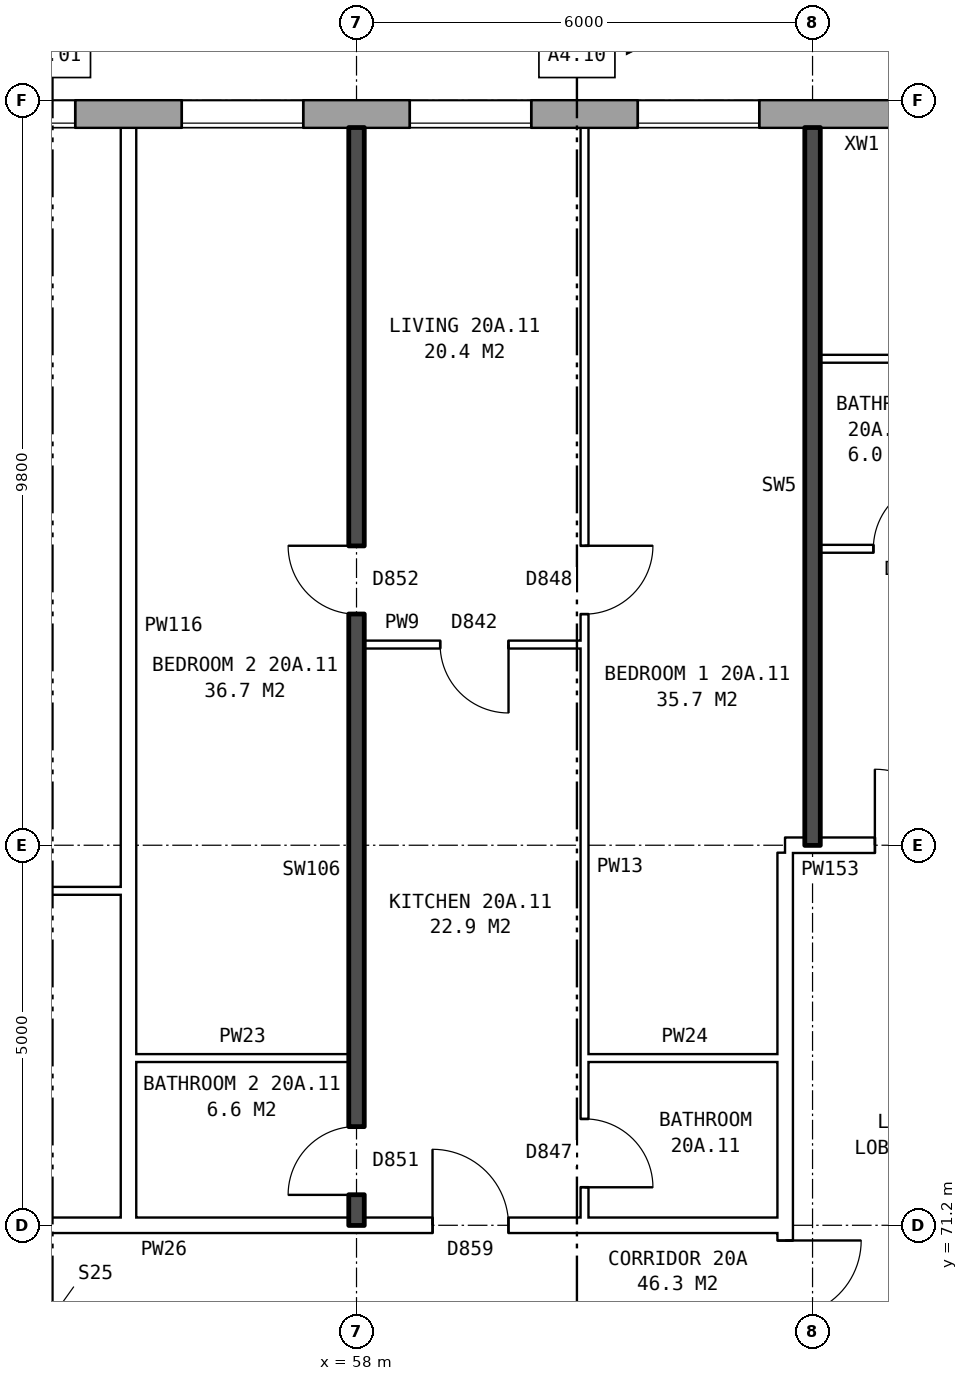
"""IFC4 building model, lengths in metres.
Left out: names, types, materials, properties, quantities, classifications, styles, units other than length and angle.
Written with IfcOpenShell. Run it as: python <this file> out.ifc"""

import sys

from ifc_helpers import new_model, si_unit, direction, frame, frame_2d, origin, place, context, subcontext, project, spatial, rectangle, extrude, element, fill, save


model = new_model("IFC4")
c1 = context("Model", 3, precision=1e-05, world=origin(), true_north=direction((0.0, 1.0)))
c2 = subcontext(c1, "Body", "Model", "MODEL_VIEW")
j1 = project(units=[si_unit("LENGTHUNIT", "METRE"), si_unit("PLANEANGLEUNIT", "RADIAN")], contexts=[c1])
p1 = place(None, origin())
s1 = spatial("IfcSite", under=j1, at=p1, CompositionType="ELEMENT")
p2 = place(p1, origin())
s2 = spatial("IfcBuilding", under=s1, at=p2, CompositionType="ELEMENT")
p3 = place(p2, frame((0.0, 0.0, 74.7)))
s3 = spatial("IfcBuildingStorey", under=s2, at=p3, CompositionType="ELEMENT", Elevation=74.7)
p4 = place(p3, frame((72.925, 85.82, 0.0), z_axis=(0.0, 0.0, 1.0), x_axis=(-1.0, 0.0, 0.0)))
e1 = element("IfcWall", 1, at=p4, inside=s3, PredefinedType="STANDARD", context=c2, shape_type="SweptSolid", body=[
    extrude(rectangle(XDim=46.601, YDim=0.36, at=frame_2d((23.3, 0.0))), origin(), (0.0, 0.0, 1.0), 2.85),
])
p5 = place(p4, frame((0.625, 0.0, 0.8)))
e2 = element("IfcOpeningElement", 2, at=p5, cuts=e1, PredefinedType="OPENING", context=c2, shape_type="SweptSolid", body=[
    extrude(rectangle(XDim=1.6, YDim=1.8, at=frame_2d((0.8, 0.9))), frame((0.0, 0.19, 0.0), z_axis=(0.0, -1.0, 0.0), x_axis=(1.0, 0.0, 0.0)), (0.0, 0.0, 1.0), 0.38),
])
p6 = place(p4, frame((3.625, 0.0, 0.8)))
e3 = element("IfcOpeningElement", 3, at=p6, cuts=e1, PredefinedType="OPENING", context=c2, shape_type="SweptSolid", body=[
    extrude(rectangle(XDim=1.6, YDim=1.8, at=frame_2d((0.8, 0.9))), frame((0.0, 0.19, 0.0), z_axis=(0.0, -1.0, 0.0), x_axis=(1.0, 0.0, 0.0)), (0.0, 0.0, 1.0), 0.38),
])
p7 = place(p4, frame((5.525, 0.0, 1.7)))
e4 = element("IfcOpeningElement", 4, at=p7, cuts=e1, PredefinedType="OPENING", context=c2, shape_type="SweptSolid", body=[
    extrude(rectangle(XDim=1.4, YDim=0.9, at=frame_2d((0.7, 0.45))), frame((0.0, 0.19, 0.0), z_axis=(0.0, -1.0, 0.0), x_axis=(1.0, 0.0, 0.0)), (0.0, 0.0, 1.0), 0.38),
])
p8 = place(p4, frame((9.625, 0.0, 0.8)))
e5 = element("IfcOpeningElement", 5, at=p8, cuts=e1, PredefinedType="OPENING", context=c2, shape_type="SweptSolid", body=[
    extrude(rectangle(XDim=1.6, YDim=1.8, at=frame_2d((0.8, 0.9))), frame((0.0, 0.19, 0.0), z_axis=(0.0, -1.0, 0.0), x_axis=(1.0, 0.0, 0.0)), (0.0, 0.0, 1.0), 0.38),
])
p9 = place(p4, frame((12.625, 0.0, 0.8)))
e6 = element("IfcOpeningElement", 6, at=p9, cuts=e1, PredefinedType="OPENING", context=c2, shape_type="SweptSolid", body=[
    extrude(rectangle(XDim=1.6, YDim=1.8, at=frame_2d((0.8, 0.9))), frame((0.0, 0.19, 0.0), z_axis=(0.0, -1.0, 0.0), x_axis=(1.0, 0.0, 0.0)), (0.0, 0.0, 1.0), 0.38),
])
p10 = place(p4, frame((15.625, 0.0, 0.8)))
e7 = element("IfcOpeningElement", 7, at=p10, cuts=e1, PredefinedType="OPENING", context=c2, shape_type="SweptSolid", body=[
    extrude(rectangle(XDim=1.6, YDim=1.8, at=frame_2d((0.8, 0.9))), frame((0.0, 0.19, 0.0), z_axis=(0.0, -1.0, 0.0), x_axis=(1.0, 0.0, 0.0)), (0.0, 0.0, 1.0), 0.38),
])
p11 = place(p4, frame((18.625, 0.0, 0.8)))
e8 = element("IfcOpeningElement", 8, at=p11, cuts=e1, PredefinedType="OPENING", context=c2, shape_type="SweptSolid", body=[
    extrude(rectangle(XDim=1.6, YDim=1.8, at=frame_2d((0.8, 0.9))), frame((0.0, 0.19, 0.0), z_axis=(0.0, -1.0, 0.0), x_axis=(1.0, 0.0, 0.0)), (0.0, 0.0, 1.0), 0.38),
])
p12 = place(p4, frame((21.625, 0.0, 0.8)))
e9 = element("IfcOpeningElement", 9, at=p12, cuts=e1, PredefinedType="OPENING", context=c2, shape_type="SweptSolid", body=[
    extrude(rectangle(XDim=1.6, YDim=1.8, at=frame_2d((0.8, 0.9))), frame((0.0, 0.19, 0.0), z_axis=(0.0, -1.0, 0.0), x_axis=(1.0, 0.0, 0.0)), (0.0, 0.0, 1.0), 0.38),
])
p13 = place(p4, frame((24.625, 0.0, 0.8)))
e10 = element("IfcOpeningElement", 10, at=p13, cuts=e1, PredefinedType="OPENING", context=c2, shape_type="SweptSolid", body=[
    extrude(rectangle(XDim=1.6, YDim=1.8, at=frame_2d((0.8, 0.9))), frame((0.0, 0.19, 0.0), z_axis=(0.0, -1.0, 0.0), x_axis=(1.0, 0.0, 0.0)), (0.0, 0.0, 1.0), 0.38),
])
p14 = place(p4, frame((27.625, 0.0, 0.8)))
e11 = element("IfcOpeningElement", 11, at=p14, cuts=e1, PredefinedType="OPENING", context=c2, shape_type="SweptSolid", body=[
    extrude(rectangle(XDim=1.6, YDim=1.8, at=frame_2d((0.8, 0.9))), frame((0.0, 0.19, 0.0), z_axis=(0.0, -1.0, 0.0), x_axis=(1.0, 0.0, 0.0)), (0.0, 0.0, 1.0), 0.38),
])
p15 = place(p4, frame((30.625, 0.0, 0.8)))
e12 = element("IfcOpeningElement", 12, at=p15, cuts=e1, PredefinedType="OPENING", context=c2, shape_type="SweptSolid", body=[
    extrude(rectangle(XDim=1.6, YDim=1.8, at=frame_2d((0.8, 0.9))), frame((0.0, 0.19, 0.0), z_axis=(0.0, -1.0, 0.0), x_axis=(1.0, 0.0, 0.0)), (0.0, 0.0, 1.0), 0.38),
])
p16 = place(p4, frame((33.625, 0.0, 0.8)))
e13 = element("IfcOpeningElement", 13, at=p16, cuts=e1, PredefinedType="OPENING", context=c2, shape_type="SweptSolid", body=[
    extrude(rectangle(XDim=1.6, YDim=1.8, at=frame_2d((0.8, 0.9))), frame((0.0, 0.19, 0.0), z_axis=(0.0, -1.0, 0.0), x_axis=(1.0, 0.0, 0.0)), (0.0, 0.0, 1.0), 0.38),
])
p17 = place(p4, frame((36.125, 0.0, 0.8)))
e14 = element("IfcOpeningElement", 14, at=p17, cuts=e1, PredefinedType="OPENING", context=c2, shape_type="SweptSolid", body=[
    extrude(rectangle(XDim=1.0, YDim=1.8, at=frame_2d((0.5, 0.9))), frame((0.0, 0.19, 0.0), z_axis=(0.0, -1.0, 0.0), x_axis=(1.0, 0.0, 0.0)), (0.0, 0.0, 1.0), 0.38),
])
p18 = place(p4, frame((39.625, 0.0, 1.7)))
e15 = element("IfcOpeningElement", 15, at=p18, cuts=e1, PredefinedType="OPENING", context=c2, shape_type="SweptSolid", body=[
    extrude(rectangle(XDim=0.8, YDim=0.9, at=frame_2d((0.4, 0.45))), frame((0.0, 0.19, 0.0), z_axis=(0.0, -1.0, 0.0), x_axis=(1.0, 0.0, 0.0)), (0.0, 0.0, 1.0), 0.38),
])
p19 = place(p4, frame((42.625, 0.0, 0.8)))
e16 = element("IfcOpeningElement", 16, at=p19, cuts=e1, PredefinedType="OPENING", context=c2, shape_type="SweptSolid", body=[
    extrude(rectangle(XDim=1.6, YDim=1.8, at=frame_2d((0.8, 0.9))), frame((0.0, 0.19, 0.0), z_axis=(0.0, -1.0, 0.0), x_axis=(1.0, 0.0, 0.0)), (0.0, 0.0, 1.0), 0.38),
])
p20 = place(p4, frame((37.425, 0.0, 0.8)))
e17 = element("IfcOpeningElement", 17, at=p20, cuts=e1, PredefinedType="OPENING", context=c2, shape_type="SweptSolid", body=[
    extrude(rectangle(XDim=0.8, YDim=0.9, at=frame_2d((0.4, 0.45))), frame((0.0, 0.19, 0.0), z_axis=(0.0, -1.0, 0.0), x_axis=(1.0, 0.0, 0.0)), (0.0, 0.0, 1.0), 0.38),
])
p21 = place(p4, frame((40.725, 0.0, 0.8)))
e18 = element("IfcOpeningElement", 18, at=p21, cuts=e1, PredefinedType="OPENING", context=c2, shape_type="SweptSolid", body=[
    extrude(rectangle(XDim=1.6, YDim=1.8, at=frame_2d((0.8, 0.9))), frame((0.0, 0.19, 0.0), z_axis=(0.0, -1.0, 0.0), x_axis=(1.0, 0.0, 0.0)), (0.0, 0.0, 1.0), 0.38),
])
p22 = place(p3, frame((63.64, 63.9, 0.0), z_axis=(0.0, 0.0, 1.0), x_axis=(0.0, 1.0, 0.0)))
e19 = element("IfcWall", 19, at=p22, inside=s3, PredefinedType="PARTITIONING", context=c2, shape_type="SweptSolid", body=[
    extrude(rectangle(XDim=12.2, YDim=0.2, at=frame_2d((6.1, 0.0))), origin(), (0.0, 0.0, 1.0), 2.85),
])
p23 = place(p22, frame((5.1, 0.0, 0.0)))
e20 = element("IfcOpeningElement", 20, at=p23, cuts=e19, PredefinedType="OPENING", context=c2, shape_type="SweptSolid", body=[
    extrude(rectangle(XDim=2.0, YDim=2.1, at=frame_2d((1.0, 1.05))), frame((0.0, 0.11, 0.0), z_axis=(0.0, -1.0, 0.0), x_axis=(1.0, 0.0, 0.0)), (0.0, 0.0, 1.0), 0.22),
])
p24 = place(p3, frame((44.36, 71.2, 0.0), z_axis=(0.0, 0.0, 1.0), x_axis=(1.0, 0.0, 0.0)))
e21 = element("IfcWall", 21, at=p24, inside=s3, PredefinedType="PARTITIONING", context=c2, shape_type="SweptSolid", body=[
    extrude(rectangle(XDim=19.28, YDim=0.2, at=frame_2d((9.64, 0.0))), origin(), (0.0, 0.0, 1.0), 2.85),
])
p25 = place(p24, frame((14.64, 0.0, 0.0)))
e22 = element("IfcOpeningElement", 22, at=p25, cuts=e21, PredefinedType="OPENING", context=c2, shape_type="SweptSolid", body=[
    extrude(rectangle(XDim=1.0, YDim=2.1, at=frame_2d((0.5, 1.05))), frame((0.0, 0.11, 0.0), z_axis=(0.0, -1.0, 0.0), x_axis=(1.0, 0.0, 0.0)), (0.0, 0.0, 1.0), 0.22),
])
p26 = place(p24, frame((5.64, 0.0, 0.0)))
e23 = element("IfcOpeningElement", 23, at=p26, cuts=e21, PredefinedType="OPENING", context=c2, shape_type="SweptSolid", body=[
    extrude(rectangle(XDim=1.0, YDim=2.1, at=frame_2d((0.5, 1.05))), frame((0.0, 0.11, 0.0), z_axis=(0.0, -1.0, 0.0), x_axis=(1.0, 0.0, 0.0)), (0.0, 0.0, 1.0), 0.22),
])
p27 = place(p3, frame((55.1, 73.4, 0.0), z_axis=(0.0, 0.0, 1.0), x_axis=(1.0, 0.0, 0.0)))
e24 = element("IfcWall", 24, at=p27, inside=s3, PredefinedType="PARTITIONING", context=c2, shape_type="SweptSolid", body=[
    extrude(rectangle(XDim=2.8, YDim=0.1, at=frame_2d((1.4, 0.0))), origin(), (0.0, 0.0, 1.0), 2.85),
])
p28 = place(p3, frame((61.0, 73.4, 0.0), z_axis=(0.0, 0.0, 1.0), x_axis=(1.0, 0.0, 0.0)))
e25 = element("IfcWall", 25, at=p28, inside=s3, PredefinedType="PARTITIONING", context=c2, shape_type="SweptSolid", body=[
    extrude(rectangle(XDim=2.64, YDim=0.1, at=frame_2d((1.32, 0.0))), origin(), (0.0, 0.0, 1.0), 2.85),
])
p29 = place(p3, frame((52.1, 75.6, 0.0), z_axis=(0.0, 0.0, 1.0), x_axis=(1.0, 0.0, 0.0)))
e26 = element("IfcWall", 26, at=p29, inside=s3, PredefinedType="PARTITIONING", context=c2, shape_type="SweptSolid", body=[
    extrude(rectangle(XDim=2.8, YDim=0.1, at=frame_2d((1.4, 0.0))), origin(), (0.0, 0.0, 1.0), 2.85),
])
p30 = place(p3, frame((63.64, 76.2, 0.0), z_axis=(0.0, 0.0, 1.0), x_axis=(1.0, 0.0, 0.0)))
e27 = element("IfcWall", 27, at=p30, inside=s3, PredefinedType="PARTITIONING", context=c2, shape_type="SweptSolid", body=[
    extrude(rectangle(XDim=3.0, YDim=0.2, at=frame_2d((1.5, 0.0))), origin(), (0.0, 0.0, 1.0), 2.85),
])
p31 = place(p30, frame((1.18, 0.0, 0.0)))
e28 = element("IfcOpeningElement", 28, at=p31, cuts=e27, PredefinedType="OPENING", context=c2, shape_type="SweptSolid", body=[
    extrude(rectangle(XDim=1.0, YDim=2.1, at=frame_2d((0.5, 1.05))), frame((0.0, 0.11, 0.0), z_axis=(0.0, -1.0, 0.0), x_axis=(1.0, 0.0, 0.0)), (0.0, 0.0, 1.0), 0.22),
])
p32 = place(p3, frame((58.1, 78.84, 0.0), z_axis=(0.0, 0.0, 1.0), x_axis=(1.0, 0.0, 0.0)))
e29 = element("IfcWall", 29, at=p32, inside=s3, PredefinedType="PARTITIONING", context=c2, shape_type="SweptSolid", body=[
    extrude(rectangle(XDim=2.9, YDim=0.1, at=frame_2d((1.45, 0.0))), origin(), (0.0, 0.0, 1.0), 2.85),
])
p33 = place(p32, frame((1.0, 0.0, 0.0)))
e30 = element("IfcOpeningElement", 30, at=p33, cuts=e29, PredefinedType="OPENING", context=c2, shape_type="SweptSolid", body=[
    extrude(rectangle(XDim=0.9, YDim=2.1, at=frame_2d((0.45, 1.05))), frame((0.0, 0.06, 0.0), z_axis=(0.0, -1.0, 0.0), x_axis=(1.0, 0.0, 0.0)), (0.0, 0.0, 1.0), 0.12),
])
p34 = place(p3, frame((64.1, 80.1, 0.0), z_axis=(0.0, 0.0, 1.0), x_axis=(1.0, 0.0, 0.0)))
e31 = element("IfcWall", 31, at=p34, inside=s3, PredefinedType="PARTITIONING", context=c2, shape_type="SweptSolid", body=[
    extrude(rectangle(XDim=5.8, YDim=0.1, at=frame_2d((2.9, 0.0))), origin(), (0.0, 0.0, 1.0), 2.85),
])
p35 = place(p34, frame((3.6, 0.0, 0.0)))
e32 = element("IfcOpeningElement", 32, at=p35, cuts=e31, PredefinedType="OPENING", context=c2, shape_type="SweptSolid", body=[
    extrude(rectangle(XDim=0.9, YDim=2.1, at=frame_2d((0.45, 1.05))), frame((0.0, 0.06, 0.0), z_axis=(0.0, -1.0, 0.0), x_axis=(1.0, 0.0, 0.0)), (0.0, 0.0, 1.0), 0.12),
])
p36 = place(p34, frame((0.7, 0.0, 0.0)))
e33 = element("IfcOpeningElement", 33, at=p36, cuts=e31, PredefinedType="OPENING", context=c2, shape_type="SweptSolid", body=[
    extrude(rectangle(XDim=0.9, YDim=2.1, at=frame_2d((0.45, 1.05))), frame((0.0, 0.06, 0.0), z_axis=(0.0, -1.0, 0.0), x_axis=(1.0, 0.0, 0.0)), (0.0, 0.0, 1.0), 0.12),
])
p37 = place(p3, frame((64.1, 82.6, 0.0), z_axis=(0.0, 0.0, 1.0), x_axis=(1.0, 0.0, 0.0)))
e34 = element("IfcWall", 34, at=p37, inside=s3, PredefinedType="PARTITIONING", context=c2, shape_type="SweptSolid", body=[
    extrude(rectangle(XDim=2.3, YDim=0.1, at=frame_2d((1.15, 0.0))), origin(), (0.0, 0.0, 1.0), 2.85),
])
p38 = place(p3, frame((55.0, 71.3, 0.0), z_axis=(0.0, 0.0, 1.0), x_axis=(0.0, 1.0, 0.0)))
e35 = element("IfcWall", 35, at=p38, inside=s3, PredefinedType="PARTITIONING", context=c2, shape_type="SweptSolid", body=[
    extrude(rectangle(XDim=14.34, YDim=0.2, at=frame_2d((7.17, 0.0))), origin(), (0.0, 0.0, 1.0), 2.85),
])
p39 = place(p3, frame((58.0, 71.2, 0.0), z_axis=(0.0, 0.0, 1.0), x_axis=(0.0, 1.0, 0.0)))
e36 = element("IfcWall", 36, at=p39, inside=s3, PredefinedType="SOLIDWALL", context=c2, shape_type="SweptSolid", body=[
    extrude(rectangle(XDim=14.44, YDim=0.2, at=frame_2d((7.22, 0.0))), origin(), (0.0, 0.0, 1.0), 2.85),
])
p40 = place(p39, frame((8.04, 0.0, 0.0)))
e37 = element("IfcOpeningElement", 37, at=p40, cuts=e36, PredefinedType="OPENING", context=c2, shape_type="SweptSolid", body=[
    extrude(rectangle(XDim=0.9, YDim=2.1, at=frame_2d((0.45, 1.05))), frame((0.0, 0.11, 0.0), z_axis=(0.0, -1.0, 0.0), x_axis=(1.0, 0.0, 0.0)), (0.0, 0.0, 1.0), 0.22),
])
p41 = place(p39, frame((0.4, 0.0, 0.0)))
e38 = element("IfcOpeningElement", 38, at=p41, cuts=e36, PredefinedType="OPENING", context=c2, shape_type="SweptSolid", body=[
    extrude(rectangle(XDim=0.9, YDim=2.1, at=frame_2d((0.45, 1.05))), frame((0.0, 0.11, 0.0), z_axis=(0.0, -1.0, 0.0), x_axis=(1.0, 0.0, 0.0)), (0.0, 0.0, 1.0), 0.22),
])
p42 = place(p3, frame((61.0, 71.3, 0.0), z_axis=(0.0, 0.0, 1.0), x_axis=(0.0, 1.0, 0.0)))
e39 = element("IfcWall", 39, at=p42, inside=s3, PredefinedType="PARTITIONING", context=c2, shape_type="SweptSolid", body=[
    extrude(rectangle(XDim=14.34, YDim=0.1, at=frame_2d((7.17, 0.0))), origin(), (0.0, 0.0, 1.0), 2.85),
])
p43 = place(p42, frame((7.94, 0.0, 0.0)))
e40 = element("IfcOpeningElement", 40, at=p43, cuts=e39, PredefinedType="OPENING", context=c2, shape_type="SweptSolid", body=[
    extrude(rectangle(XDim=0.9, YDim=2.1, at=frame_2d((0.45, 1.05))), frame((0.0, 0.06, 0.0), z_axis=(0.0, -1.0, 0.0), x_axis=(1.0, 0.0, 0.0)), (0.0, 0.0, 1.0), 0.12),
])
p44 = place(p42, frame((0.4, 0.0, 0.0)))
e41 = element("IfcOpeningElement", 41, at=p44, cuts=e39, PredefinedType="OPENING", context=c2, shape_type="SweptSolid", body=[
    extrude(rectangle(XDim=0.9, YDim=2.1, at=frame_2d((0.45, 1.05))), frame((0.0, 0.06, 0.0), z_axis=(0.0, -1.0, 0.0), x_axis=(1.0, 0.0, 0.0)), (0.0, 0.0, 1.0), 0.12),
])
p45 = place(p3, frame((64.0, 76.2, 0.0), z_axis=(0.0, 0.0, 1.0), x_axis=(0.0, 1.0, 0.0)))
e42 = element("IfcWall", 42, at=p45, inside=s3, PredefinedType="SOLIDWALL", context=c2, shape_type="SweptSolid", body=[
    extrude(rectangle(XDim=9.44, YDim=0.2, at=frame_2d((4.72, 0.0))), origin(), (0.0, 0.0, 1.0), 2.85),
])
p46 = place(p8, origin())
e43 = element("IfcWindow", 43, at=p46, inside=s3, PartitioningType="SINGLE_PANEL", PredefinedType="WINDOW", context=c2, shape_type="SweptSolid", body=[
    extrude(rectangle(XDim=1.6, YDim=1.8, at=frame_2d((0.8, 0.9))), frame((0.0, 0.15, 0.0), z_axis=(0.0, -1.0, 0.0), x_axis=(1.0, 0.0, 0.0)), (0.0, 0.0, 1.0), 0.06),
])
fill(e5, e43)
p47 = place(p9, origin())
e44 = element("IfcWindow", 44, at=p47, inside=s3, PartitioningType="SINGLE_PANEL", PredefinedType="WINDOW", context=c2, shape_type="SweptSolid", body=[
    extrude(rectangle(XDim=1.6, YDim=1.8, at=frame_2d((0.8, 0.9))), frame((0.0, 0.15, 0.0), z_axis=(0.0, -1.0, 0.0), x_axis=(1.0, 0.0, 0.0)), (0.0, 0.0, 1.0), 0.06),
])
fill(e6, e44)
p48 = place(p10, origin())
e45 = element("IfcWindow", 45, at=p48, inside=s3, PartitioningType="SINGLE_PANEL", PredefinedType="WINDOW", context=c2, shape_type="SweptSolid", body=[
    extrude(rectangle(XDim=1.6, YDim=1.8, at=frame_2d((0.8, 0.9))), frame((0.0, 0.15, 0.0), z_axis=(0.0, -1.0, 0.0), x_axis=(1.0, 0.0, 0.0)), (0.0, 0.0, 1.0), 0.06),
])
fill(e7, e45)
p49 = place(p11, origin())
e46 = element("IfcWindow", 46, at=p49, inside=s3, PartitioningType="SINGLE_PANEL", PredefinedType="WINDOW", context=c2, shape_type="SweptSolid", body=[
    extrude(rectangle(XDim=1.6, YDim=1.8, at=frame_2d((0.8, 0.9))), frame((0.0, 0.15, 0.0), z_axis=(0.0, -1.0, 0.0), x_axis=(1.0, 0.0, 0.0)), (0.0, 0.0, 1.0), 0.06),
])
fill(e8, e46)
p50 = place(p23, frame((2.0, 0.0, 0.0), z_axis=(0.0, 0.0, 1.0), x_axis=(-1.0, 0.0, 0.0)))
e47 = element("IfcDoor", 47, at=p50, inside=s3, OperationType="DOUBLE_DOOR_SINGLE_SWING", PredefinedType="DOOR", context=c2, shape_type="SweptSolid", body=[
    extrude(rectangle(XDim=2.0, YDim=2.1, at=frame_2d((1.0, 1.05))), frame((0.0, 0.025, 0.0), z_axis=(0.0, -1.0, 0.0), x_axis=(1.0, 0.0, 0.0)), (0.0, 0.0, 1.0), 0.05),
])
fill(e20, e47)
p51 = place(p31, origin())
e48 = element("IfcDoor", 48, at=p51, inside=s3, OperationType="SINGLE_SWING_LEFT", PredefinedType="DOOR", context=c2, shape_type="SweptSolid", body=[
    extrude(rectangle(XDim=1.0, YDim=2.1, at=frame_2d((0.5, 1.05))), frame((0.0, 0.025, 0.0), z_axis=(0.0, -1.0, 0.0), x_axis=(1.0, 0.0, 0.0)), (0.0, 0.0, 1.0), 0.05),
])
fill(e28, e48)
p52 = place(p36, origin())
e49 = element("IfcDoor", 49, at=p52, inside=s3, OperationType="SINGLE_SWING_RIGHT", PredefinedType="DOOR", context=c2, shape_type="SweptSolid", body=[
    extrude(rectangle(XDim=0.9, YDim=2.1, at=frame_2d((0.45, 1.05))), frame((0.0, 0.025, 0.0), z_axis=(0.0, -1.0, 0.0), x_axis=(1.0, 0.0, 0.0)), (0.0, 0.0, 1.0), 0.05),
])
fill(e33, e49)
p53 = place(p43, frame((0.9, 0.0, 0.0), z_axis=(0.0, 0.0, 1.0), x_axis=(-1.0, 0.0, 0.0)))
e50 = element("IfcDoor", 50, at=p53, inside=s3, OperationType="SINGLE_SWING_LEFT", PredefinedType="DOOR", context=c2, shape_type="SweptSolid", body=[
    extrude(rectangle(XDim=0.9, YDim=2.1, at=frame_2d((0.45, 1.05))), frame((0.0, 0.025, 0.0), z_axis=(0.0, -1.0, 0.0), x_axis=(1.0, 0.0, 0.0)), (0.0, 0.0, 1.0), 0.05),
])
fill(e40, e50)
p54 = place(p40, origin())
e51 = element("IfcDoor", 51, at=p54, inside=s3, OperationType="SINGLE_SWING_RIGHT", PredefinedType="DOOR", context=c2, shape_type="SweptSolid", body=[
    extrude(rectangle(XDim=0.9, YDim=2.1, at=frame_2d((0.45, 1.05))), frame((0.0, 0.025, 0.0), z_axis=(0.0, -1.0, 0.0), x_axis=(1.0, 0.0, 0.0)), (0.0, 0.0, 1.0), 0.05),
])
fill(e37, e51)
p55 = place(p25, origin())
e52 = element("IfcDoor", 52, at=p55, inside=s3, OperationType="SINGLE_SWING_LEFT", PredefinedType="DOOR", context=c2, shape_type="SweptSolid", body=[
    extrude(rectangle(XDim=1.0, YDim=2.1, at=frame_2d((0.5, 1.05))), frame((0.0, 0.025, 0.0), z_axis=(0.0, -1.0, 0.0), x_axis=(1.0, 0.0, 0.0)), (0.0, 0.0, 1.0), 0.05),
])
fill(e22, e52)
p56 = place(p33, frame((0.9, 0.0, 0.0), z_axis=(0.0, 0.0, 1.0), x_axis=(-1.0, 0.0, 0.0)))
e53 = element("IfcDoor", 53, at=p56, inside=s3, OperationType="SINGLE_SWING_LEFT", PredefinedType="DOOR", context=c2, shape_type="SweptSolid", body=[
    extrude(rectangle(XDim=0.9, YDim=2.1, at=frame_2d((0.45, 1.05))), frame((0.0, 0.025, 0.0), z_axis=(0.0, -1.0, 0.0), x_axis=(1.0, 0.0, 0.0)), (0.0, 0.0, 1.0), 0.05),
])
fill(e30, e53)
p57 = place(p44, frame((0.9, 0.0, 0.0), z_axis=(0.0, 0.0, 1.0), x_axis=(-1.0, 0.0, 0.0)))
e54 = element("IfcDoor", 54, at=p57, inside=s3, OperationType="SINGLE_SWING_RIGHT", PredefinedType="DOOR", context=c2, shape_type="SweptSolid", body=[
    extrude(rectangle(XDim=0.9, YDim=2.1, at=frame_2d((0.45, 1.05))), frame((0.0, 0.025, 0.0), z_axis=(0.0, -1.0, 0.0), x_axis=(1.0, 0.0, 0.0)), (0.0, 0.0, 1.0), 0.05),
])
fill(e41, e54)
p58 = place(p41, origin())
e55 = element("IfcDoor", 55, at=p58, inside=s3, OperationType="SINGLE_SWING_LEFT", PredefinedType="DOOR", context=c2, shape_type="SweptSolid", body=[
    extrude(rectangle(XDim=0.9, YDim=2.1, at=frame_2d((0.45, 1.05))), frame((0.0, 0.025, 0.0), z_axis=(0.0, -1.0, 0.0), x_axis=(1.0, 0.0, 0.0)), (0.0, 0.0, 1.0), 0.05),
])
fill(e38, e55)
save(model, sys.argv[1])
